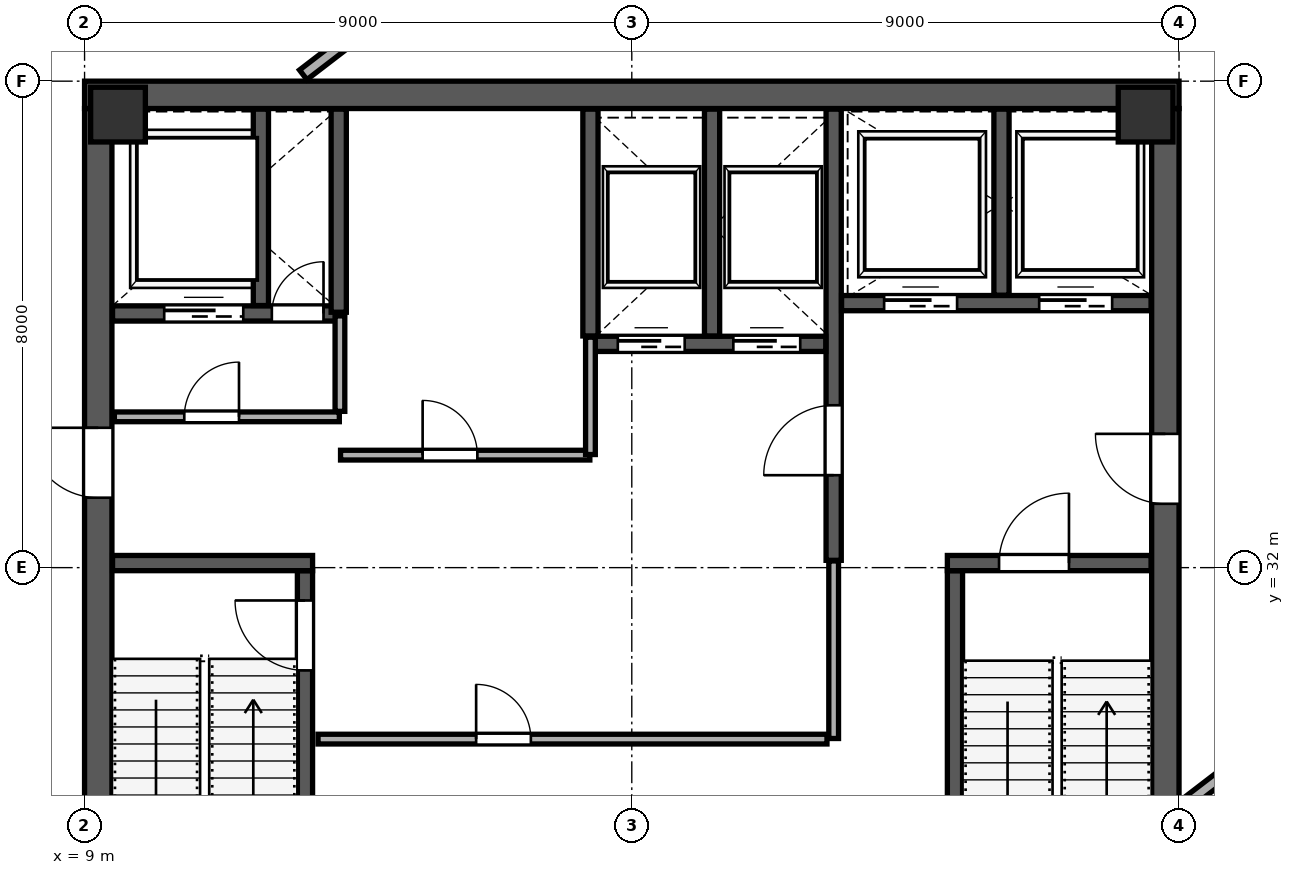
"""IFC4 building model, lengths in metres.
Left out: names, types, materials, properties, quantities, classifications, styles, units other than length and angle.
Written with IfcOpenShell. Run it as: python <this file> out.ifc"""

import sys

from ifc_helpers import new_model, si_unit, direction, frame, frame_2d, origin, origin_2d, place, context, subcontext, project, spatial, rectangle, extrude, source, transform, mapped, element, fill, save


model = new_model("IFC4")
c1 = context("Model", 3, precision=1e-05, world=origin(), true_north=direction((0.0, 1.0)))
c2 = subcontext(c1, "Body", "Model", "MODEL_VIEW")
j1 = project(units=[si_unit("LENGTHUNIT", "METRE"), si_unit("PLANEANGLEUNIT", "RADIAN")], contexts=[c1])
p1 = place(None, origin())
s1 = spatial("IfcSite", under=j1, at=p1, CompositionType="ELEMENT")
p2 = place(p1, origin())
s2 = spatial("IfcBuilding", under=s1, at=p2, CompositionType="ELEMENT")
p3 = place(p2, frame((0.0, 0.0, 287.8)))
s3 = spatial("IfcBuildingStorey", under=s2, at=p3, CompositionType="ELEMENT", Elevation=287.8)
m1 = source(origin(), c2, "Body", "SweptSolid", [
    extrude(rectangle(XDim=0.9, YDim=0.9, at=origin_2d()), origin(), (0.0, 0.0, 1.0), 5.999),
])
for number, where, z_axis, x_axis in (
    (1, (9.55, 39.45, 0.001), (0.0, 0.0, 1.0), (1.0, 0.0, 0.0)),
    (2, (26.45, 39.45, 0.001), (0.0, 0.0, 1.0), (1.0, 0.0, 0.0)),
):
    element("IfcColumn", number, at=place(p3, frame(where, z_axis=z_axis, x_axis=x_axis)), inside=s3, PredefinedType="COLUMN", context=c2, shape_type="MappedRepresentation", body=[
        mapped(m1, transform((0.0, 0.0, 0.0), scale=1.0)),
    ])
p4 = place(p3, frame((20.034, 53.022, 0.0), z_axis=(0.0, 0.0, 1.0), x_axis=(-0.793352190684, -0.608762927203, 0.0)))
e3 = element("IfcWall", 3, at=p4, inside=s3, PredefinedType="SOLIDWALL", context=c2, shape_type="SweptSolid", body=[
    extrude(rectangle(XDim=25.269, YDim=0.25, at=frame_2d((12.634, 0.0))), origin(), (0.0, 0.0, 1.0), 4.955),
])
p5 = place(p3, frame((9.225, 24.45, 0.0), z_axis=(0.0, 0.0, 1.0), x_axis=(0.0, 1.0, 0.0)))
e4 = element("IfcWall", 4, at=p5, inside=s3, PredefinedType="SHEAR", context=c2, shape_type="SweptSolid", body=[
    extrude(rectangle(XDim=15.1, YDim=0.45, at=frame_2d((7.55, 0.0))), origin(), (0.0, 0.0, 1.0), 5.72),
])
p6 = place(p5, frame((8.7, 0.0, 0.0)))
e5 = element("IfcOpeningElement", 5, at=p6, cuts=e4, PredefinedType="OPENING", context=c2, shape_type="SweptSolid", body=[
    extrude(rectangle(XDim=1.15, YDim=2.2, at=frame_2d((0.575, 1.1))), frame((0.0, 0.235, 0.0), z_axis=(0.0, -1.0, 0.0), x_axis=(1.0, 0.0, 0.0)), (0.0, 0.0, 1.0), 0.47),
])
p7 = place(p3, frame((26.775, 24.45, 0.0), z_axis=(0.0, 0.0, 1.0), x_axis=(0.0, 1.0, 0.0)))
e6 = element("IfcWall", 6, at=p7, inside=s3, PredefinedType="SHEAR", context=c2, shape_type="SweptSolid", body=[
    extrude(rectangle(XDim=15.1, YDim=0.45, at=frame_2d((7.55, 0.0))), origin(), (0.0, 0.0, 1.0), 5.72),
])
p8 = place(p7, frame((8.6, 0.0, 0.0)))
e7 = element("IfcOpeningElement", 7, at=p8, cuts=e6, PredefinedType="OPENING", context=c2, shape_type="SweptSolid", body=[
    extrude(rectangle(XDim=1.15, YDim=2.2, at=frame_2d((0.575, 1.1))), frame((0.0, 0.235, 0.0), z_axis=(0.0, -1.0, 0.0), x_axis=(1.0, 0.0, 0.0)), (0.0, 0.0, 1.0), 0.47),
])
p9 = place(p3, frame((9.0, 39.775, 0.0), z_axis=(0.0, 0.0, 1.0), x_axis=(1.0, 0.0, 0.0)))
e8 = element("IfcWall", 8, at=p9, inside=s3, PredefinedType="SHEAR", context=c2, shape_type="SweptSolid", body=[
    extrude(rectangle(XDim=18.0, YDim=0.45, at=frame_2d((9.0, 0.0))), origin(), (0.0, 0.0, 1.0), 5.72),
])
p10 = place(p3, frame((12.625, 24.46, 0.0), z_axis=(0.0, 0.0, 1.0), x_axis=(0.0, 1.0, 0.0)))
e9 = element("IfcWall", 9, at=p10, inside=s3, PredefinedType="SHEAR", context=c2, shape_type="SweptSolid", body=[
    extrude(rectangle(XDim=7.49, YDim=0.25, at=frame_2d((3.745, 0.0))), origin(), (0.0, 0.0, 1.0), 5.72),
])
p11 = place(p10, frame((5.85, 0.0, 0.0)))
e10 = element("IfcOpeningElement", 10, at=p11, cuts=e9, PredefinedType="OPENING", context=c2, shape_type="SweptSolid", body=[
    extrude(rectangle(XDim=1.15, YDim=2.2, at=frame_2d((0.575, 1.1))), frame((0.0, 0.135, 0.0), z_axis=(0.0, -1.0, 0.0), x_axis=(1.0, 0.0, 0.0)), (0.0, 0.0, 1.0), 0.27),
])
p12 = place(p3, frame((9.46, 32.075, 0.0), z_axis=(0.0, 0.0, 1.0), x_axis=(1.0, 0.0, 0.0)))
e11 = element("IfcWall", 11, at=p12, inside=s3, PredefinedType="SHEAR", context=c2, shape_type="SweptSolid", body=[
    extrude(rectangle(XDim=3.29, YDim=0.25, at=frame_2d((1.645, 0.0))), origin(), (0.0, 0.0, 1.0), 5.72),
])
p13 = place(p3, frame((23.315, 24.46, 0.0), z_axis=(0.0, 0.0, 1.0), x_axis=(0.0, 1.0, 0.0)))
e12 = element("IfcWall", 12, at=p13, inside=s3, PredefinedType="SHEAR", context=c2, shape_type="SweptSolid", body=[
    extrude(rectangle(XDim=7.49, YDim=0.25, at=frame_2d((3.745, 0.0))), origin(), (0.0, 0.0, 1.0), 5.72),
])
p14 = place(p3, frame((23.19, 32.075, 0.0), z_axis=(0.0, 0.0, 1.0), x_axis=(1.0, 0.0, 0.0)))
e13 = element("IfcWall", 13, at=p14, inside=s3, PredefinedType="SHEAR", context=c2, shape_type="SweptSolid", body=[
    extrude(rectangle(XDim=3.35, YDim=0.25, at=frame_2d((1.675, 0.0))), origin(), (0.0, 0.0, 1.0), 5.72),
])
p15 = place(p14, frame((0.85, 0.0, 0.0)))
e14 = element("IfcOpeningElement", 14, at=p15, cuts=e13, PredefinedType="OPENING", context=c2, shape_type="SweptSolid", body=[
    extrude(rectangle(XDim=1.15, YDim=2.2, at=frame_2d((0.575, 1.1))), frame((0.0, 0.135, 0.0), z_axis=(0.0, -1.0, 0.0), x_axis=(1.0, 0.0, 0.0)), (0.0, 0.0, 1.0), 0.27),
])
p16 = place(p3, frame((21.32, 32.12, 0.0), z_axis=(0.0, 0.0, 1.0), x_axis=(0.0, 1.0, 0.0)))
e15 = element("IfcWall", 15, at=p16, inside=s3, PredefinedType="SHEAR", context=c2, shape_type="SweptSolid", body=[
    extrude(rectangle(XDim=7.42, YDim=0.25, at=frame_2d((3.71, 0.0))), origin(), (0.0, 0.0, 1.0), 5.72),
])
p17 = place(p16, frame((1.4, 0.0, 0.0)))
e16 = element("IfcOpeningElement", 16, at=p17, cuts=e15, PredefinedType="OPENING", context=c2, shape_type="SweptSolid", body=[
    extrude(rectangle(XDim=1.15, YDim=2.2, at=frame_2d((0.575, 1.1))), frame((0.0, 0.135, 0.0), z_axis=(0.0, -1.0, 0.0), x_axis=(1.0, 0.0, 0.0)), (0.0, 0.0, 1.0), 0.27),
])
p18 = place(p3, frame((9.46, 36.18, 0.0), z_axis=(0.0, 0.0, 1.0), x_axis=(1.0, 0.0, 0.0)))
e17 = element("IfcWall", 17, at=p18, inside=s3, PredefinedType="SHEAR", context=c2, shape_type="SweptSolid", body=[
    extrude(rectangle(XDim=3.79, YDim=0.25, at=frame_2d((1.895, 0.0))), origin(), (0.0, 0.0, 1.0), 5.72),
])
p19 = place(p18, frame((2.62, 0.0, 0.0)))
e18 = element("IfcOpeningElement", 18, at=p19, cuts=e17, PredefinedType="OPENING", context=c2, shape_type="SweptSolid", body=[
    extrude(rectangle(XDim=0.85, YDim=2.1, at=frame_2d((0.425, 1.05))), frame((0.0, 0.135, 0.0), z_axis=(0.0, -1.0, 0.0), x_axis=(1.0, 0.0, 0.0)), (0.0, 0.0, 1.0), 0.27),
])
p20 = place(p18, frame((0.85, 0.0, 0.0)))
e19 = element("IfcOpeningElement", 19, at=p20, cuts=e17, PredefinedType="OPENING", context=c2, shape_type="SweptSolid", body=[
    extrude(rectangle(XDim=1.3, YDim=2.25, at=frame_2d((0.65, 1.125))), frame((0.0, 0.135, 0.0), z_axis=(0.0, -1.0, 0.0), x_axis=(1.0, 0.0, 0.0)), (0.0, 0.0, 1.0), 0.27),
])
p21 = place(p3, frame((11.9, 36.31, 0.0), z_axis=(0.0, 0.0, 1.0), x_axis=(0.0, 1.0, 0.0)))
e20 = element("IfcWall", 20, at=p21, inside=s3, PredefinedType="SHEAR", context=c2, shape_type="SweptSolid", body=[
    extrude(rectangle(XDim=3.23, YDim=0.25, at=frame_2d((1.615, 0.0))), origin(), (0.0, 0.0, 1.0), 5.72),
])
p22 = place(p3, frame((21.45, 36.35, 0.0), z_axis=(0.0, 0.0, 1.0), x_axis=(1.0, 0.0, 0.0)))
e21 = element("IfcWall", 21, at=p22, inside=s3, PredefinedType="SHEAR", context=c2, shape_type="SweptSolid", body=[
    extrude(rectangle(XDim=5.09, YDim=0.25, at=frame_2d((2.545, 0.0))), origin(), (0.0, 0.0, 1.0), 5.72),
])
p23 = place(p22, frame((0.7, 0.0, 0.0)))
e22 = element("IfcOpeningElement", 22, at=p23, cuts=e21, PredefinedType="OPENING", context=c2, shape_type="SweptSolid", body=[
    extrude(rectangle(XDim=1.2, YDim=2.2, at=frame_2d((0.6, 1.1))), frame((0.0, 0.135, 0.0), z_axis=(0.0, -1.0, 0.0), x_axis=(1.0, 0.0, 0.0)), (0.0, 0.0, 1.0), 0.27),
])
p24 = place(p22, frame((3.25, 0.0, 0.0)))
e23 = element("IfcOpeningElement", 23, at=p24, cuts=e21, PredefinedType="OPENING", context=c2, shape_type="SweptSolid", body=[
    extrude(rectangle(XDim=1.2, YDim=2.2, at=frame_2d((0.6, 1.1))), frame((0.0, 0.135, 0.0), z_axis=(0.0, -1.0, 0.0), x_axis=(1.0, 0.0, 0.0)), (0.0, 0.0, 1.0), 0.27),
])
p25 = place(p3, frame((24.08, 36.48, 0.0), z_axis=(0.0, 0.0, 1.0), x_axis=(0.0, 1.0, 0.0)))
e24 = element("IfcWall", 24, at=p25, inside=s3, PredefinedType="SHEAR", context=c2, shape_type="SweptSolid", body=[
    extrude(rectangle(XDim=3.06, YDim=0.25, at=frame_2d((1.53, 0.0))), origin(), (0.0, 0.0, 1.0), 5.72),
])
p26 = place(p3, frame((13.18, 36.2, 0.0), z_axis=(0.0, 0.0, 1.0), x_axis=(0.0, 1.0, 0.0)))
e25 = element("IfcWall", 25, at=p26, inside=s3, PredefinedType="SHEAR", context=c2, shape_type="SweptSolid", body=[
    extrude(rectangle(XDim=3.34, YDim=0.25, at=frame_2d((1.67, 0.0))), origin(), (0.0, 0.0, 1.0), 5.72),
])
p27 = place(p3, frame((17.32, 35.68, 0.0), z_axis=(0.0, 0.0, 1.0), x_axis=(1.0, 0.0, 0.0)))
e26 = element("IfcWall", 26, at=p27, inside=s3, PredefinedType="SHEAR", context=c2, shape_type="SweptSolid", body=[
    extrude(rectangle(XDim=3.87, YDim=0.25, at=frame_2d((1.935, 0.0))), origin(), (0.0, 0.0, 1.0), 5.72),
])
p28 = place(p27, frame((0.45, 0.0, 0.0)))
e27 = element("IfcOpeningElement", 27, at=p28, cuts=e26, PredefinedType="OPENING", context=c2, shape_type="SweptSolid", body=[
    extrude(rectangle(XDim=1.1, YDim=2.2, at=frame_2d((0.55, 1.1))), frame((0.0, 0.135, 0.0), z_axis=(0.0, -1.0, 0.0), x_axis=(1.0, 0.0, 0.0)), (0.0, 0.0, 1.0), 0.27),
])
p29 = place(p27, frame((2.35, 0.0, 0.0)))
e28 = element("IfcOpeningElement", 28, at=p29, cuts=e26, PredefinedType="OPENING", context=c2, shape_type="SweptSolid", body=[
    extrude(rectangle(XDim=1.1, YDim=2.2, at=frame_2d((0.55, 1.1))), frame((0.0, 0.135, 0.0), z_axis=(0.0, -1.0, 0.0), x_axis=(1.0, 0.0, 0.0)), (0.0, 0.0, 1.0), 0.27),
])
for number, where, z_axis, x_axis in (
    (29, (17.32, 35.81, 0.0), (0.0, 0.0, 1.0), (0.0, 1.0, 0.0)),
    (30, (19.32, 35.81, 0.0), (0.0, 0.0, 1.0), (0.0, 1.0, 0.0)),
):
    element("IfcWall", number, at=place(p3, frame(where, z_axis=z_axis, x_axis=x_axis)), inside=s3, PredefinedType="SHEAR", context=c2, shape_type="SweptSolid", body=[
        extrude(rectangle(XDim=3.73, YDim=0.25, at=frame_2d((1.865, 0.0))), origin(), (0.0, 0.0, 1.0), 5.72),
    ])
p30 = place(p3, frame((9.49, 34.48, 0.0), z_axis=(0.0, 0.0, 1.0), x_axis=(1.0, 0.0, 0.0)))
e31 = element("IfcWall", 31, at=p30, inside=s3, PredefinedType="PARTITIONING", context=c2, shape_type="SweptSolid", body=[
    extrude(rectangle(XDim=3.7, YDim=0.16, at=frame_2d((1.85, 0.0))), origin(), (0.0, 0.0, 1.0), 5.72),
])
p31 = place(p30, frame((1.15, 0.0, 0.0)))
e32 = element("IfcOpeningElement", 32, at=p31, cuts=e31, PredefinedType="OPENING", context=c2, shape_type="SweptSolid", body=[
    extrude(rectangle(XDim=0.9, YDim=2.15, at=frame_2d((0.45, 1.075))), frame((0.0, 0.09, 0.0), z_axis=(0.0, -1.0, 0.0), x_axis=(1.0, 0.0, 0.0)), (0.0, 0.0, 1.0), 0.18),
])
p32 = place(p3, frame((13.2, 34.57, 0.0), z_axis=(0.0, 0.0, 1.0), x_axis=(0.0, 1.0, 0.0)))
e33 = element("IfcWall", 33, at=p32, inside=s3, PredefinedType="PARTITIONING", context=c2, shape_type="SweptSolid", body=[
    extrude(rectangle(XDim=1.57, YDim=0.16, at=frame_2d((0.785, 0.0))), origin(), (0.0, 0.0, 1.0), 5.72),
])
p33 = place(p3, frame((13.21, 33.85, 0.0), z_axis=(0.0, 0.0, 1.0), x_axis=(1.0, 0.0, 0.0)))
e34 = element("IfcWall", 34, at=p33, inside=s3, PredefinedType="PARTITIONING", context=c2, shape_type="SweptSolid", body=[
    extrude(rectangle(XDim=4.1, YDim=0.16, at=frame_2d((2.05, 0.0))), origin(), (0.0, 0.0, 1.0), 5.72),
])
p34 = place(p33, frame((1.35, 0.0, 0.0)))
e35 = element("IfcOpeningElement", 35, at=p34, cuts=e34, PredefinedType="OPENING", context=c2, shape_type="SweptSolid", body=[
    extrude(rectangle(XDim=0.9, YDim=2.15, at=frame_2d((0.45, 1.075))), frame((0.0, 0.09, 0.0), z_axis=(0.0, -1.0, 0.0), x_axis=(1.0, 0.0, 0.0)), (0.0, 0.0, 1.0), 0.18),
])
p35 = place(p3, frame((17.32, 33.86, 0.0), z_axis=(0.0, 0.0, 1.0), x_axis=(0.0, 1.0, 0.0)))
e36 = element("IfcWall", 36, at=p35, inside=s3, PredefinedType="PARTITIONING", context=c2, shape_type="SweptSolid", body=[
    extrude(rectangle(XDim=1.93, YDim=0.16, at=frame_2d((0.965, 0.0))), origin(), (0.0, 0.0, 1.0), 5.72),
])
p36 = place(p3, frame((12.84, 29.18, 0.0), z_axis=(0.0, 0.0, 1.0), x_axis=(1.0, 0.0, 0.0)))
e37 = element("IfcWall", 37, at=p36, inside=s3, PredefinedType="PARTITIONING", context=c2, shape_type="SweptSolid", body=[
    extrude(rectangle(XDim=8.37, YDim=0.16, at=frame_2d((4.185, 0.0))), origin(), (0.0, 0.0, 1.0), 5.72),
])
p37 = place(p36, frame((2.6, 0.0, 0.0)))
e38 = element("IfcOpeningElement", 38, at=p37, cuts=e37, PredefinedType="OPENING", context=c2, shape_type="SweptSolid", body=[
    extrude(rectangle(XDim=0.9, YDim=2.15, at=frame_2d((0.45, 1.075))), frame((0.0, 0.09, 0.0), z_axis=(0.0, -1.0, 0.0), x_axis=(1.0, 0.0, 0.0)), (0.0, 0.0, 1.0), 0.18),
])
p38 = place(p3, frame((21.32, 29.19, 0.0), z_axis=(0.0, 0.0, 1.0), x_axis=(0.0, 1.0, 0.0)))
e39 = element("IfcWall", 39, at=p38, inside=s3, PredefinedType="PARTITIONING", context=c2, shape_type="SweptSolid", body=[
    extrude(rectangle(XDim=2.92, YDim=0.16, at=frame_2d((1.46, 0.0))), origin(), (0.0, 0.0, 1.0), 5.72),
])
p39 = place(p3, frame((-0.413, 34.373, 0.0), z_axis=(0.0, 0.0, 1.0), x_axis=(0.608759126262, -0.793355107246, 0.0)))
e40 = element("IfcWall", 40, at=p39, inside=s3, PredefinedType="SOLIDWALL", context=c2, shape_type="SweptSolid", body=[
    extrude(rectangle(XDim=21.682, YDim=0.2, at=frame_2d((10.841, 0.0))), origin(), (0.0, 0.0, 1.0), 5.72),
])
p40 = place(p39, frame((14.26, 0.0, 0.0)))
e41 = element("IfcOpeningElement", 41, at=p40, cuts=e40, PredefinedType="OPENING", context=c2, shape_type="SweptSolid", body=[
    extrude(rectangle(XDim=1.1, YDim=2.2, at=frame_2d((0.55, 1.1))), frame((0.0, 0.11, 0.0), z_axis=(0.0, -1.0, 0.0), x_axis=(1.0, 0.0, 0.0)), (0.0, 0.0, 1.0), 0.22),
])
p41 = place(p3, frame((27.112, 28.113, 0.0), z_axis=(0.0, 0.0, 1.0), x_axis=(0.793358129931, 0.608755186977, 0.0)))
e42 = element("IfcWall", 42, at=p41, inside=s3, PredefinedType="SOLIDWALL", context=c2, shape_type="SweptSolid", body=[
    extrude(rectangle(XDim=13.934, YDim=0.2, at=frame_2d((6.967, 0.0))), origin(), (0.0, 0.0, 1.0), 4.955),
])
p42 = place(p3, frame((12.596, 40.104, 0.0), z_axis=(0.0, 0.0, 1.0), x_axis=(0.793370042757, 0.608739661314, 0.0)))
e43 = element("IfcWall", 43, at=p42, inside=s3, PredefinedType="SOLIDWALL", context=c2, shape_type="SweptSolid", body=[
    extrude(rectangle(XDim=12.69, YDim=0.2, at=frame_2d((6.345, 0.0))), origin(), (0.0, 0.0, 1.0), 5.72),
])
p43 = place(p42, frame((10.47, 0.0, 0.0)))
e44 = element("IfcOpeningElement", 44, at=p43, cuts=e43, PredefinedType="OPENING", context=c2, shape_type="SweptSolid", body=[
    extrude(rectangle(XDim=1.2, YDim=2.2, at=frame_2d((0.6, 1.1))), frame((0.0, 0.11, 0.0), z_axis=(0.0, -1.0, 0.0), x_axis=(1.0, 0.0, 0.0)), (0.0, 0.0, 1.0), 0.22),
])
m2 = source(origin(), c2, "Body", "SweptSolid", [
    extrude(rectangle(XDim=1.15, YDim=2.2, at=frame_2d((0.575, 1.1))), frame((0.0, 0.025, 0.0), z_axis=(0.0, -1.0, 0.0), x_axis=(1.0, 0.0, 0.0)), (0.0, 0.0, 1.0), 0.05),
])
p44 = place(p11, origin())
e45 = element("IfcDoor", 45, at=p44, inside=s3, OperationType="SINGLE_SWING_RIGHT", PredefinedType="DOOR", context=c2, shape_type="MappedRepresentation", body=[
    mapped(m2, transform((0.0, 0.0, 0.0), scale=1.0)),
])
fill(e10, e45)
m3 = source(origin(), c2, "Body", "SweptSolid", [
    extrude(rectangle(XDim=1.15, YDim=2.2, at=frame_2d((0.575, 1.1))), frame((0.0, 0.025, 0.0), z_axis=(0.0, -1.0, 0.0), x_axis=(1.0, 0.0, 0.0)), (0.0, 0.0, 1.0), 0.05),
])
p45 = place(p17, origin())
e46 = element("IfcDoor", 46, at=p45, inside=s3, OperationType="SINGLE_SWING_LEFT", PredefinedType="DOOR", context=c2, shape_type="MappedRepresentation", body=[
    mapped(m3, transform((0.0, 0.0, 0.0), scale=1.0)),
])
fill(e16, e46)
p46 = place(p15, origin())
e47 = element("IfcDoor", 47, at=p46, inside=s3, OperationType="SINGLE_SWING_RIGHT", PredefinedType="DOOR", context=c2, shape_type="MappedRepresentation", body=[
    mapped(m2, transform((0.0, 0.0, 0.0), scale=1.0)),
])
fill(e14, e47)
p47 = place(p8, origin())
e48 = element("IfcDoor", 48, at=p47, inside=s3, OperationType="SINGLE_SWING_RIGHT", PredefinedType="DOOR", context=c2, shape_type="MappedRepresentation", body=[
    mapped(m3, transform((0.0, 0.0, 0.0), scale=1.0)),
])
fill(e7, e48)
p48 = place(p6, origin())
e49 = element("IfcDoor", 49, at=p48, inside=s3, OperationType="SINGLE_SWING_RIGHT", PredefinedType="DOOR", context=c2, shape_type="MappedRepresentation", body=[
    mapped(m3, transform((0.0, 0.0, 0.0), scale=1.0)),
])
fill(e5, e49)
m4 = source(origin(), c2, "Body", "SweptSolid", [
    extrude(rectangle(XDim=0.85, YDim=2.1, at=frame_2d((0.425, 1.05))), frame((0.0, 0.025, 0.0), z_axis=(0.0, -1.0, 0.0), x_axis=(1.0, 0.0, 0.0)), (0.0, 0.0, 1.0), 0.05),
])
p49 = place(p19, origin())
e50 = element("IfcDoor", 50, at=p49, inside=s3, OperationType="SINGLE_SWING_RIGHT", PredefinedType="DOOR", context=c2, shape_type="MappedRepresentation", body=[
    mapped(m4, transform((0.0, 0.0, 0.0), scale=1.0)),
])
fill(e18, e50)
m5 = source(origin(), c2, "Body", "SweptSolid", [
    extrude(rectangle(XDim=1.1, YDim=2.2, at=frame_2d((0.55, 1.1))), frame((0.0, 0.025, 0.0), z_axis=(0.0, -1.0, 0.0), x_axis=(1.0, 0.0, 0.0)), (0.0, 0.0, 1.0), 0.05),
])
p50 = place(p28, origin())
e51 = element("IfcDoor", 51, at=p50, inside=s3, OperationType="SLIDING_TO_LEFT", PredefinedType="DOOR", context=c2, shape_type="MappedRepresentation", body=[
    mapped(m5, transform((0.0, 0.0, 0.0), scale=1.0)),
])
fill(e27, e51)
p51 = place(p29, origin())
e52 = element("IfcDoor", 52, at=p51, inside=s3, OperationType="SLIDING_TO_RIGHT", PredefinedType="DOOR", context=c2, shape_type="MappedRepresentation", body=[
    mapped(m5, transform((0.0, 0.0, 0.0), scale=1.0)),
])
fill(e28, e52)
m6 = source(origin(), c2, "Body", "SweptSolid", [
    extrude(rectangle(XDim=1.2, YDim=2.2, at=frame_2d((0.6, 1.1))), frame((0.0, 0.025, 0.0), z_axis=(0.0, -1.0, 0.0), x_axis=(1.0, 0.0, 0.0)), (0.0, 0.0, 1.0), 0.05),
])
p52 = place(p23, origin())
e53 = element("IfcDoor", 53, at=p52, inside=s3, OperationType="SLIDING_TO_LEFT", PredefinedType="DOOR", context=c2, shape_type="MappedRepresentation", body=[
    mapped(m6, transform((0.0, 0.0, 0.0), scale=1.0)),
])
fill(e22, e53)
p53 = place(p24, origin())
e54 = element("IfcDoor", 54, at=p53, inside=s3, OperationType="SLIDING_TO_RIGHT", PredefinedType="DOOR", context=c2, shape_type="MappedRepresentation", body=[
    mapped(m6, transform((0.0, 0.0, 0.0), scale=1.0)),
])
fill(e23, e54)
m7 = source(origin(), c2, "Body", "SweptSolid", [
    extrude(rectangle(XDim=1.3, YDim=2.25, at=frame_2d((0.65, 1.125))), frame((0.0, 0.025, 0.0), z_axis=(0.0, -1.0, 0.0), x_axis=(1.0, 0.0, 0.0)), (0.0, 0.0, 1.0), 0.05),
])
p54 = place(p20, origin())
e55 = element("IfcDoor", 55, at=p54, inside=s3, OperationType="SLIDING_TO_LEFT", PredefinedType="DOOR", context=c2, shape_type="MappedRepresentation", body=[
    mapped(m7, transform((0.0, 0.0, 0.0), scale=1.0)),
])
fill(e19, e55)
m8 = source(origin(), c2, "Body", "SweptSolid", [
    extrude(rectangle(XDim=0.9, YDim=2.15, at=frame_2d((0.45, 1.075))), frame((0.0, 0.025, 0.0), z_axis=(0.0, -1.0, 0.0), x_axis=(1.0, 0.0, 0.0)), (0.0, 0.0, 1.0), 0.05),
])
p55 = place(p31, origin())
e56 = element("IfcDoor", 56, at=p55, inside=s3, OperationType="SINGLE_SWING_RIGHT", PredefinedType="DOOR", context=c2, shape_type="MappedRepresentation", body=[
    mapped(m8, transform((0.0, 0.0, 0.0), scale=1.0)),
])
fill(e32, e56)
p56 = place(p34, origin())
e57 = element("IfcDoor", 57, at=p56, inside=s3, OperationType="SINGLE_SWING_LEFT", PredefinedType="DOOR", context=c2, shape_type="MappedRepresentation", body=[
    mapped(m8, transform((0.0, 0.0, 0.0), scale=1.0)),
])
fill(e35, e57)
p57 = place(p37, origin())
e58 = element("IfcDoor", 58, at=p57, inside=s3, OperationType="SINGLE_SWING_LEFT", PredefinedType="DOOR", context=c2, shape_type="MappedRepresentation", body=[
    mapped(m8, transform((0.0, 0.0, 0.0), scale=1.0)),
])
fill(e38, e58)
save(model, sys.argv[1])
